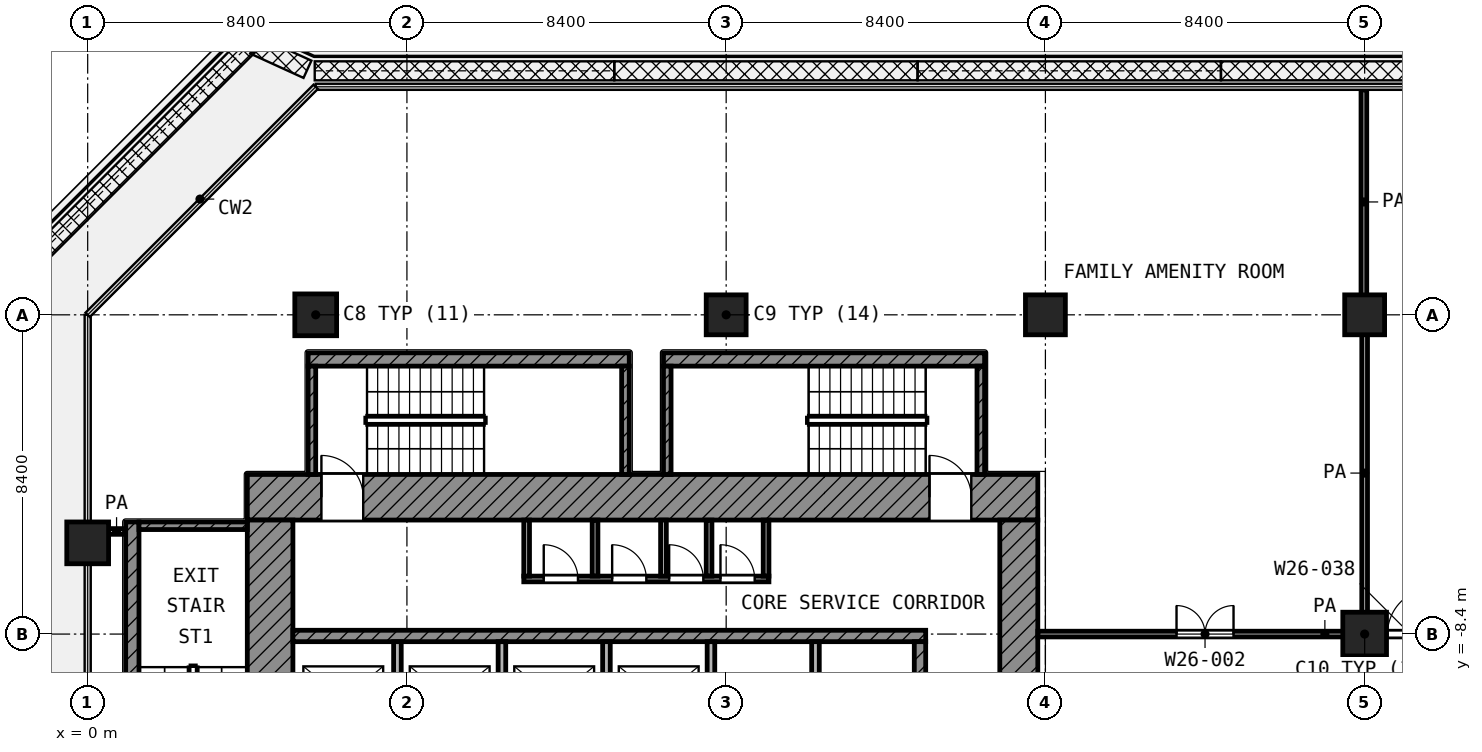
"""IFC4 building model, lengths in metres.
Left out: names, types, materials, properties, quantities, classifications, styles, units other than length and angle.
Written with IfcOpenShell. Run it as: python <this file> out.ifc"""

import sys

from ifc_helpers import new_model, si_unit, direction, frame, frame_2d, origin, origin_2d, place, context, subcontext, project, spatial, rectangle, extrude, element, fill, save


model = new_model("IFC4")
c1 = context("Model", 3, precision=1e-05, world=origin(), true_north=direction((0.0, 1.0)))
c2 = subcontext(c1, "Body", "Model", "MODEL_VIEW")
j1 = project(units=[si_unit("LENGTHUNIT", "METRE"), si_unit("PLANEANGLEUNIT", "RADIAN")], contexts=[c1])
p1 = place(None, origin())
s1 = spatial("IfcSite", under=j1, at=p1, CompositionType="ELEMENT")
p2 = place(p1, origin())
s2 = spatial("IfcBuilding", under=s1, at=p2, CompositionType="ELEMENT")
p3 = place(p2, frame((0.0, 0.0, 115.6)))
s3 = spatial("IfcBuildingStorey", under=s2, at=p3, CompositionType="ELEMENT", Elevation=115.6)
p4 = place(p3, frame((6.0, 0.0, 0.0), z_axis=(0.0, 0.0, 1.0), x_axis=(1.0, 0.0, 0.0)))
e1 = element("IfcColumn", 1, at=p4, inside=s3, PredefinedType="COLUMN", context=c2, shape_type="SweptSolid", body=[
    extrude(rectangle(XDim=1.1, YDim=1.1, at=origin_2d()), origin(), (0.0, 0.0, 1.0), 4.2),
])
for number, where, z_axis, x_axis in (
    (2, (16.8, 0.0, 0.0), (0.0, 0.0, 1.0), (1.0, 0.0, 0.0)),
    (3, (25.2, 0.0, 0.0), (0.0, 0.0, 1.0), (1.0, 0.0, 0.0)),
    (4, (33.6, 0.0, 0.0), (0.0, 0.0, 1.0), (1.0, 0.0, 0.0)),
):
    element("IfcColumn", number, at=place(p3, frame(where, z_axis=z_axis, x_axis=x_axis)), inside=s3, PredefinedType="COLUMN", context=c2, shape_type="SweptSolid", body=[
        extrude(rectangle(XDim=1.05, YDim=1.05, at=origin_2d()), origin(), (0.0, 0.0, 1.0), 4.2),
    ])
p5 = place(p3, frame((0.0, -6.0, 0.0), z_axis=(0.0, 0.0, 1.0), x_axis=(1.0, 0.0, 0.0)))
e5 = element("IfcColumn", 5, at=p5, inside=s3, PredefinedType="COLUMN", context=c2, shape_type="SweptSolid", body=[
    extrude(rectangle(XDim=1.1, YDim=1.1, at=origin_2d()), origin(), (0.0, 0.0, 1.0), 4.2),
])
p6 = place(p3, frame((33.6, -8.4, 0.0), z_axis=(0.0, 0.0, 1.0), x_axis=(1.0, 0.0, 0.0)))
e6 = element("IfcColumn", 6, at=p6, inside=s3, PredefinedType="COLUMN", context=c2, shape_type="SweptSolid", body=[
    extrude(rectangle(XDim=1.15, YDim=1.15, at=origin_2d()), origin(), (0.0, 0.0, 1.0), 4.2),
])
p7 = place(p3, frame((4.2, -4.8, 0.0), z_axis=(0.0, 0.0, 1.0), x_axis=(1.0, 0.0, 0.0)))
e7 = element("IfcWall", 7, at=p7, inside=s3, PredefinedType="SHEAR", context=c2, shape_type="SweptSolid", body=[
    extrude(rectangle(XDim=20.8, YDim=1.2, at=frame_2d((10.4, 0.0))), origin(), (0.0, 0.0, 1.0), 3.6),
])
p8 = place(p7, frame((1.95, 0.0, 0.0)))
e8 = element("IfcOpeningElement", 8, at=p8, cuts=e7, PredefinedType="OPENING", context=c2, shape_type="SweptSolid", body=[
    extrude(rectangle(XDim=1.1, YDim=2.1, at=frame_2d((0.55, 1.05))), frame((0.0, 0.61, 0.0), z_axis=(0.0, -1.0, 0.0), x_axis=(1.0, 0.0, 0.0)), (0.0, 0.0, 1.0), 1.22),
])
p9 = place(p7, frame((17.95, 0.0, 0.0)))
e9 = element("IfcOpeningElement", 9, at=p9, cuts=e7, PredefinedType="OPENING", context=c2, shape_type="SweptSolid", body=[
    extrude(rectangle(XDim=1.1, YDim=2.1, at=frame_2d((0.55, 1.05))), frame((0.0, 0.61, 0.0), z_axis=(0.0, -1.0, 0.0), x_axis=(1.0, 0.0, 0.0)), (0.0, 0.0, 1.0), 1.22),
])
p10 = place(p3, frame((4.8, -25.0, 0.0), z_axis=(0.0, 0.0, 1.0), x_axis=(0.0, 1.0, 0.0)))
e10 = element("IfcWall", 10, at=p10, inside=s3, PredefinedType="SHEAR", context=c2, shape_type="SweptSolid", body=[
    extrude(rectangle(XDim=19.6, YDim=1.2, at=frame_2d((9.8, 0.0))), origin(), (0.0, 0.0, 1.0), 3.6),
])
p11 = place(p10, frame((11.45, 0.0, 0.0)))
e11 = element("IfcOpeningElement", 11, at=p11, cuts=e10, PredefinedType="OPENING", context=c2, shape_type="SweptSolid", body=[
    extrude(rectangle(XDim=1.1, YDim=2.1, at=frame_2d((0.55, 1.05))), frame((0.0, 0.61, 0.0), z_axis=(0.0, -1.0, 0.0), x_axis=(1.0, 0.0, 0.0)), (0.0, 0.0, 1.0), 1.22),
])
p12 = place(p10, frame((2.15, 0.0, 0.0)))
e12 = element("IfcOpeningElement", 12, at=p12, cuts=e10, PredefinedType="OPENING", context=c2, shape_type="SweptSolid", body=[
    extrude(rectangle(XDim=1.1, YDim=2.1, at=frame_2d((0.55, 1.05))), frame((0.0, 0.61, 0.0), z_axis=(0.0, -1.0, 0.0), x_axis=(1.0, 0.0, 0.0)), (0.0, 0.0, 1.0), 1.22),
])
p13 = place(p3, frame((24.5, -24.0, 0.0), z_axis=(0.0, 0.0, 1.0), x_axis=(0.0, 1.0, 0.0)))
e13 = element("IfcWall", 13, at=p13, inside=s3, PredefinedType="SHEAR", context=c2, shape_type="SweptSolid", body=[
    extrude(rectangle(XDim=18.6, YDim=1.0, at=frame_2d((9.3, 0.0))), origin(), (0.0, 0.0, 1.0), 3.6),
])
p14 = place(p13, frame((10.5, 0.0, 0.0)))
e14 = element("IfcOpeningElement", 14, at=p14, cuts=e13, PredefinedType="OPENING", context=c2, shape_type="SweptSolid", body=[
    extrude(rectangle(XDim=1.8, YDim=2.1, at=frame_2d((0.9, 1.05))), frame((0.0, 0.51, 0.0), z_axis=(0.0, -1.0, 0.0), x_axis=(1.0, 0.0, 0.0)), (0.0, 0.0, 1.0), 1.02),
])
p15 = place(p3, frame((5.4, -8.45, 0.0), z_axis=(0.0, 0.0, 1.0), x_axis=(1.0, 0.0, 0.0)))
e15 = element("IfcWall", 15, at=p15, inside=s3, PredefinedType="SHEAR", context=c2, shape_type="SweptSolid", body=[
    extrude(rectangle(XDim=16.65, YDim=0.3, at=frame_2d((8.325, 0.0))), origin(), (0.0, 0.0, 1.0), 3.6),
])
p16 = place(p3, frame((21.9, -10.95, 0.0), z_axis=(0.0, 0.0, 1.0), x_axis=(0.0, 1.0, 0.0)))
e16 = element("IfcWall", 16, at=p16, inside=s3, PredefinedType="SHEAR", context=c2, shape_type="SweptSolid", body=[
    extrude(rectangle(XDim=2.35, YDim=0.3, at=frame_2d((1.175, 0.0))), origin(), (0.0, 0.0, 1.0), 3.6),
])
for number, where, z_axis, x_axis in (
    (17, (8.15, -10.95, 0.0), (0.0, 0.0, 1.0), (0.0, 1.0, 0.0)),
    (18, (10.9, -10.95, 0.0), (0.0, 0.0, 1.0), (0.0, 1.0, 0.0)),
    (19, (13.65, -10.95, 0.0), (0.0, 0.0, 1.0), (0.0, 1.0, 0.0)),
    (20, (16.4, -10.95, 0.0), (0.0, 0.0, 1.0), (0.0, 1.0, 0.0)),
    (21, (19.15, -10.95, 0.0), (0.0, 0.0, 1.0), (0.0, 1.0, 0.0)),
):
    element("IfcWall", number, at=place(p3, frame(where, z_axis=z_axis, x_axis=x_axis)), inside=s3, PredefinedType="PARTITIONING", context=c2, shape_type="SweptSolid", body=[
        extrude(rectangle(XDim=2.35, YDim=0.2, at=frame_2d((1.175, 0.0))), origin(), (0.0, 0.0, 1.0), 3.6),
    ])
p17 = place(p3, frame((11.475, -6.95, 0.0), z_axis=(0.0, 0.0, 1.0), x_axis=(1.0, 0.0, 0.0)))
e22 = element("IfcWall", 22, at=p17, inside=s3, PredefinedType="PARTITIONING", context=c2, shape_type="SweptSolid", body=[
    extrude(rectangle(XDim=6.45, YDim=0.15, at=frame_2d((3.225, 0.0))), origin(), (0.0, 0.0, 1.0), 3.6),
])
p18 = place(p17, frame((0.525, 0.0, 0.0)))
e23 = element("IfcOpeningElement", 23, at=p18, cuts=e22, PredefinedType="OPENING", context=c2, shape_type="SweptSolid", body=[
    extrude(rectangle(XDim=0.9, YDim=2.1, at=frame_2d((0.45, 1.05))), frame((0.0, 0.085, 0.0), z_axis=(0.0, -1.0, 0.0), x_axis=(1.0, 0.0, 0.0)), (0.0, 0.0, 1.0), 0.17),
])
p19 = place(p17, frame((2.325, 0.0, 0.0)))
e24 = element("IfcOpeningElement", 24, at=p19, cuts=e22, PredefinedType="OPENING", context=c2, shape_type="SweptSolid", body=[
    extrude(rectangle(XDim=0.9, YDim=2.1, at=frame_2d((0.45, 1.05))), frame((0.0, 0.085, 0.0), z_axis=(0.0, -1.0, 0.0), x_axis=(1.0, 0.0, 0.0)), (0.0, 0.0, 1.0), 0.17),
])
p20 = place(p17, frame((3.825, 0.0, 0.0)))
e25 = element("IfcOpeningElement", 25, at=p20, cuts=e22, PredefinedType="OPENING", context=c2, shape_type="SweptSolid", body=[
    extrude(rectangle(XDim=0.9, YDim=2.1, at=frame_2d((0.45, 1.05))), frame((0.0, 0.085, 0.0), z_axis=(0.0, -1.0, 0.0), x_axis=(1.0, 0.0, 0.0)), (0.0, 0.0, 1.0), 0.17),
])
p21 = place(p17, frame((5.175, 0.0, 0.0)))
e26 = element("IfcOpeningElement", 26, at=p21, cuts=e22, PredefinedType="OPENING", context=c2, shape_type="SweptSolid", body=[
    extrude(rectangle(XDim=0.9, YDim=2.1, at=frame_2d((0.45, 1.05))), frame((0.0, 0.085, 0.0), z_axis=(0.0, -1.0, 0.0), x_axis=(1.0, 0.0, 0.0)), (0.0, 0.0, 1.0), 0.17),
])
for number, where, z_axis, x_axis in (
    (27, (11.55, -6.875, 0.0), (0.0, 0.0, 1.0), (0.0, 1.0, 0.0)),
    (28, (13.35, -6.875, 0.0), (0.0, 0.0, 1.0), (0.0, 1.0, 0.0)),
    (29, (15.15, -6.875, 0.0), (0.0, 0.0, 1.0), (0.0, 1.0, 0.0)),
    (30, (16.35, -6.875, 0.0), (0.0, 0.0, 1.0), (0.0, 1.0, 0.0)),
    (31, (17.85, -6.875, 0.0), (0.0, 0.0, 1.0), (0.0, 1.0, 0.0)),
):
    element("IfcWall", number, at=place(p3, frame(where, z_axis=z_axis, x_axis=x_axis)), inside=s3, PredefinedType="PARTITIONING", context=c2, shape_type="SweptSolid", body=[
        extrude(rectangle(XDim=1.475, YDim=0.15, at=frame_2d((0.738, 0.0))), origin(), (0.0, 0.0, 1.0), 3.6),
    ])
p22 = place(p3, frame((1.175, -13.9, 0.0), z_axis=(0.0, 0.0, 1.0), x_axis=(0.0, 1.0, 0.0)))
e32 = element("IfcWall", 32, at=p22, inside=s3, PredefinedType="SHEAR", context=c2, shape_type="SweptSolid", body=[
    extrude(rectangle(XDim=8.45, YDim=0.35, at=frame_2d((4.225, 0.0))), origin(), (0.0, 0.0, 1.0), 3.6),
])
p23 = place(p3, frame((1.35, -5.55, 0.0), z_axis=(0.0, 0.0, 1.0), x_axis=(1.0, 0.0, 0.0)))
e33 = element("IfcWall", 33, at=p23, inside=s3, PredefinedType="SHEAR", context=c2, shape_type="SweptSolid", body=[
    extrude(rectangle(XDim=2.85, YDim=0.2, at=frame_2d((1.425, 0.0))), origin(), (0.0, 0.0, 1.0), 3.6),
])
p24 = place(p3, frame((5.8, -1.175, 0.0), z_axis=(0.0, 0.0, 1.0), x_axis=(1.0, 0.0, 0.0)))
e34 = element("IfcWall", 34, at=p24, inside=s3, PredefinedType="SHEAR", context=c2, shape_type="SweptSolid", body=[
    extrude(rectangle(XDim=8.45, YDim=0.35, at=frame_2d((4.225, 0.0))), origin(), (0.0, 0.0, 1.0), 3.6),
])
for number, where, z_axis, x_axis in (
    (35, (5.9, -4.2, 0.0), (0.0, 0.0, 1.0), (0.0, 1.0, 0.0)),
    (36, (14.15, -4.2, 0.0), (0.0, 0.0, 1.0), (0.0, 1.0, 0.0)),
):
    element("IfcWall", number, at=place(p3, frame(where, z_axis=z_axis, x_axis=x_axis)), inside=s3, PredefinedType="SHEAR", context=c2, shape_type="SweptSolid", body=[
        extrude(rectangle(XDim=2.85, YDim=0.2, at=frame_2d((1.425, 0.0))), origin(), (0.0, 0.0, 1.0), 3.6),
    ])
p25 = place(p3, frame((15.15, -1.175, 0.0), z_axis=(0.0, 0.0, 1.0), x_axis=(1.0, 0.0, 0.0)))
e37 = element("IfcWall", 37, at=p25, inside=s3, PredefinedType="SHEAR", context=c2, shape_type="SweptSolid", body=[
    extrude(rectangle(XDim=8.45, YDim=0.35, at=frame_2d((4.225, 0.0))), origin(), (0.0, 0.0, 1.0), 3.6),
])
for number, where, z_axis, x_axis in (
    (38, (15.25, -4.2, 0.0), (0.0, 0.0, 1.0), (0.0, 1.0, 0.0)),
    (39, (23.5, -4.2, 0.0), (0.0, 0.0, 1.0), (0.0, 1.0, 0.0)),
):
    element("IfcWall", number, at=place(p3, frame(where, z_axis=z_axis, x_axis=x_axis)), inside=s3, PredefinedType="SHEAR", context=c2, shape_type="SweptSolid", body=[
        extrude(rectangle(XDim=2.85, YDim=0.2, at=frame_2d((1.425, 0.0))), origin(), (0.0, 0.0, 1.0), 3.6),
    ])
p26 = place(p3, frame((25.0, -8.4, 0.0), z_axis=(0.0, 0.0, 1.0), x_axis=(1.0, 0.0, 0.0)))
e40 = element("IfcWall", 40, at=p26, inside=s3, PredefinedType="PARTITIONING", context=c2, shape_type="SweptSolid", body=[
    extrude(rectangle(XDim=15.107, YDim=0.15, at=frame_2d((7.553, 0.0))), origin(), (0.0, 0.0, 1.0), 3.6),
])
p27 = place(p26, frame((3.65, 0.0, 0.0)))
e41 = element("IfcOpeningElement", 41, at=p27, cuts=e40, PredefinedType="OPENING", context=c2, shape_type="SweptSolid", body=[
    extrude(rectangle(XDim=1.5, YDim=2.1, at=frame_2d((0.75, 1.05))), frame((0.0, 0.085, 0.0), z_axis=(0.0, -1.0, 0.0), x_axis=(1.0, 0.0, 0.0)), (0.0, 0.0, 1.0), 0.17),
])
p28 = place(p26, frame((9.2, 0.0, 0.0)))
e42 = element("IfcOpeningElement", 42, at=p28, cuts=e40, PredefinedType="OPENING", context=c2, shape_type="SweptSolid", body=[
    extrude(rectangle(XDim=1.2, YDim=2.1, at=frame_2d((0.6, 1.05))), frame((0.0, 0.085, 0.0), z_axis=(0.0, -1.0, 0.0), x_axis=(1.0, 0.0, 0.0)), (0.0, 0.0, 1.0), 0.17),
])
p29 = place(p3, frame((0.55, -5.7, 0.0), z_axis=(0.0, 0.0, 1.0), x_axis=(1.0, 0.0, 0.0)))
e43 = element("IfcWall", 43, at=p29, inside=s3, PredefinedType="PARTITIONING", context=c2, shape_type="SweptSolid", body=[
    extrude(rectangle(XDim=0.42, YDim=0.15, at=frame_2d((0.21, 0.0))), origin(), (0.0, 0.0, 1.0), 3.6),
])
p30 = place(p3, frame((33.58, 0.02, 0.0), z_axis=(0.0, 0.0, 1.0), x_axis=(0.0, 1.0, 0.0)))
e44 = element("IfcWall", 44, at=p30, inside=s3, PredefinedType="PARTITIONING", context=c2, shape_type="SweptSolid", body=[
    extrude(rectangle(XDim=5.9, YDim=0.15, at=frame_2d((2.95, 0.0))), origin(), (0.0, 0.0, 1.0), 3.6),
])
p31 = place(p3, frame((33.6, -8.325, 0.0), z_axis=(0.0, 0.0, 1.0), x_axis=(0.0, 1.0, 0.0)))
e45 = element("IfcWall", 45, at=p31, inside=s3, PredefinedType="PARTITIONING", context=c2, shape_type="SweptSolid", body=[
    extrude(rectangle(XDim=8.322, YDim=0.15, at=frame_2d((4.161, 0.0))), origin(), (0.0, 0.0, 1.0), 3.6),
])
p32 = place(p8, origin())
e46 = element("IfcDoor", 46, at=p32, inside=s3, OperationType="SINGLE_SWING_LEFT", PredefinedType="DOOR", context=c2, shape_type="SweptSolid", body=[
    extrude(rectangle(XDim=1.1, YDim=2.1, at=frame_2d((0.55, 1.05))), frame((0.0, 0.025, 0.0), z_axis=(0.0, -1.0, 0.0), x_axis=(1.0, 0.0, 0.0)), (0.0, 0.0, 1.0), 0.05),
])
fill(e8, e46)
p33 = place(p9, origin())
e47 = element("IfcDoor", 47, at=p33, inside=s3, OperationType="SINGLE_SWING_LEFT", PredefinedType="DOOR", context=c2, shape_type="SweptSolid", body=[
    extrude(rectangle(XDim=1.1, YDim=2.1, at=frame_2d((0.55, 1.05))), frame((0.0, 0.025, 0.0), z_axis=(0.0, -1.0, 0.0), x_axis=(1.0, 0.0, 0.0)), (0.0, 0.0, 1.0), 0.05),
])
fill(e9, e47)
p34 = place(p18, origin())
e48 = element("IfcDoor", 48, at=p34, inside=s3, OperationType="SINGLE_SWING_LEFT", PredefinedType="DOOR", context=c2, shape_type="SweptSolid", body=[
    extrude(rectangle(XDim=0.9, YDim=2.1, at=frame_2d((0.45, 1.05))), frame((0.0, 0.025, 0.0), z_axis=(0.0, -1.0, 0.0), x_axis=(1.0, 0.0, 0.0)), (0.0, 0.0, 1.0), 0.05),
])
fill(e23, e48)
p35 = place(p19, origin())
e49 = element("IfcDoor", 49, at=p35, inside=s3, OperationType="SINGLE_SWING_LEFT", PredefinedType="DOOR", context=c2, shape_type="SweptSolid", body=[
    extrude(rectangle(XDim=0.9, YDim=2.1, at=frame_2d((0.45, 1.05))), frame((0.0, 0.025, 0.0), z_axis=(0.0, -1.0, 0.0), x_axis=(1.0, 0.0, 0.0)), (0.0, 0.0, 1.0), 0.05),
])
fill(e24, e49)
p36 = place(p20, origin())
e50 = element("IfcDoor", 50, at=p36, inside=s3, OperationType="SINGLE_SWING_LEFT", PredefinedType="DOOR", context=c2, shape_type="SweptSolid", body=[
    extrude(rectangle(XDim=0.9, YDim=2.1, at=frame_2d((0.45, 1.05))), frame((0.0, 0.025, 0.0), z_axis=(0.0, -1.0, 0.0), x_axis=(1.0, 0.0, 0.0)), (0.0, 0.0, 1.0), 0.05),
])
fill(e25, e50)
p37 = place(p21, origin())
e51 = element("IfcDoor", 51, at=p37, inside=s3, OperationType="SINGLE_SWING_LEFT", PredefinedType="DOOR", context=c2, shape_type="SweptSolid", body=[
    extrude(rectangle(XDim=0.9, YDim=2.1, at=frame_2d((0.45, 1.05))), frame((0.0, 0.025, 0.0), z_axis=(0.0, -1.0, 0.0), x_axis=(1.0, 0.0, 0.0)), (0.0, 0.0, 1.0), 0.05),
])
fill(e26, e51)
p38 = place(p27, origin())
e52 = element("IfcDoor", 52, at=p38, inside=s3, OperationType="DOUBLE_DOOR_SINGLE_SWING", PredefinedType="DOOR", context=c2, shape_type="SweptSolid", body=[
    extrude(rectangle(XDim=1.5, YDim=2.1, at=frame_2d((0.75, 1.05))), frame((0.0, 0.025, 0.0), z_axis=(0.0, -1.0, 0.0), x_axis=(1.0, 0.0, 0.0)), (0.0, 0.0, 1.0), 0.05),
])
fill(e41, e52)
p39 = place(p28, origin())
e53 = element("IfcDoor", 53, at=p39, inside=s3, OperationType="SINGLE_SWING_RIGHT", PredefinedType="DOOR", context=c2, shape_type="SweptSolid", body=[
    extrude(rectangle(XDim=1.2, YDim=2.1, at=frame_2d((0.6, 1.05))), frame((0.0, 0.025, 0.0), z_axis=(0.0, -1.0, 0.0), x_axis=(1.0, 0.0, 0.0)), (0.0, 0.0, 1.0), 0.05),
])
fill(e42, e53)
save(model, sys.argv[1])
